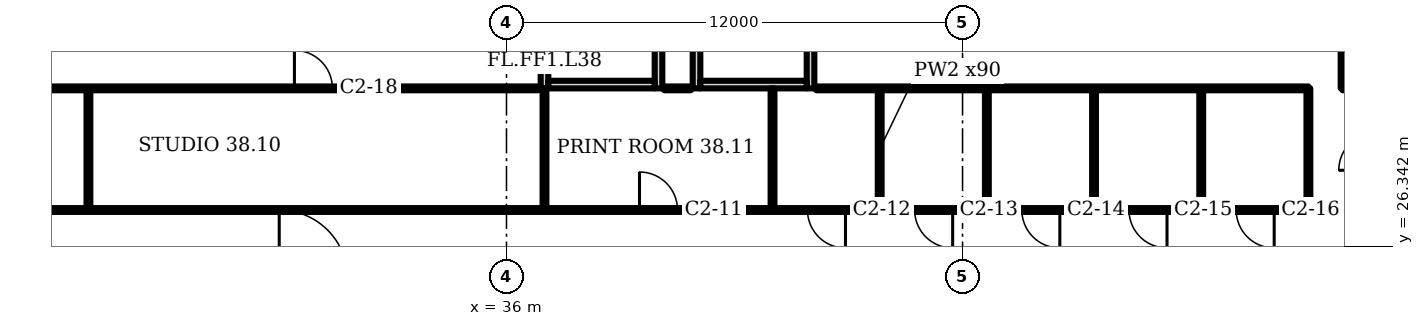
"""IFC4 building model, lengths in metres.
Left out: names, types, materials, properties, quantities, classifications, styles, units other than length and angle.
Written with IfcOpenShell. Run it as: python <this file> out.ifc"""

import sys

from ifc_helpers import new_model, si_unit, direction, frame, frame_2d, origin, place, context, subcontext, project, spatial, rectangle, extrude, element, fill, save


model = new_model("IFC4")
c1 = context("Model", 3, precision=1e-05, world=origin(), true_north=direction((0.0, 1.0)))
c2 = subcontext(c1, "Body", "Model", "MODEL_VIEW")
j1 = project(units=[si_unit("LENGTHUNIT", "METRE"), si_unit("PLANEANGLEUNIT", "RADIAN")], contexts=[c1])
p1 = place(None, origin())
s1 = spatial("IfcSite", under=j1, at=p1, CompositionType="ELEMENT")
p2 = place(p1, origin())
s2 = spatial("IfcBuilding", under=s1, at=p2, CompositionType="ELEMENT")
p3 = place(p2, frame((0.0, 0.0, 159.1)))
s3 = spatial("IfcBuildingStorey", under=s2, at=p3, CompositionType="ELEMENT", Elevation=159.1)
p4 = place(p3, frame((37.0, 30.5, 0.0), z_axis=(0.0, 0.0, 1.0), x_axis=(0.0, 1.0, 0.0)))
e1 = element("IfcWall", 1, at=p4, inside=s3, PredefinedType="PARTITIONING", context=c2, shape_type="SweptSolid", body=[
    extrude(rectangle(XDim=3.5, YDim=0.2, at=frame_2d((1.75, 0.0))), origin(), (0.0, 0.0, 1.0), 3.2),
])
p5 = place(p4, frame((1.2, 0.0, 0.0)))
e2 = element("IfcOpeningElement", 2, at=p5, cuts=e1, PredefinedType="OPENING", context=c2, shape_type="SweptSolid", body=[
    extrude(rectangle(XDim=1.1, YDim=2.1, at=frame_2d((0.55, 1.05))), frame((0.0, 0.11, 0.0), z_axis=(0.0, -1.0, 0.0), x_axis=(1.0, 0.0, 0.0)), (0.0, 0.0, 1.0), 0.22),
])
p6 = place(p3, frame((40.0, 30.5, 0.0), z_axis=(0.0, 0.0, 1.0), x_axis=(0.0, 1.0, 0.0)))
e3 = element("IfcWall", 3, at=p6, inside=s3, PredefinedType="PARTITIONING", context=c2, shape_type="SweptSolid", body=[
    extrude(rectangle(XDim=3.5, YDim=0.2, at=frame_2d((1.75, 0.0))), origin(), (0.0, 0.0, 1.0), 3.2),
])
p7 = place(p3, frame((37.1, 30.6, 0.0), z_axis=(0.0, 0.0, 1.0), x_axis=(1.0, 0.0, 0.0)))
e4 = element("IfcWall", 4, at=p7, inside=s3, PredefinedType="PARTITIONING", context=c2, shape_type="SweptSolid", body=[
    extrude(rectangle(XDim=2.8, YDim=0.2, at=frame_2d((1.4, 0.0))), origin(), (0.0, 0.0, 1.0), 3.2),
])
p8 = place(p3, frame((41.0, 30.5, 0.0), z_axis=(0.0, 0.0, 1.0), x_axis=(0.0, 1.0, 0.0)))
e5 = element("IfcWall", 5, at=p8, inside=s3, PredefinedType="PARTITIONING", context=c2, shape_type="SweptSolid", body=[
    extrude(rectangle(XDim=3.5, YDim=0.2, at=frame_2d((1.75, 0.0))), origin(), (0.0, 0.0, 1.0), 3.2),
])
p9 = place(p3, frame((44.0, 30.5, 0.0), z_axis=(0.0, 0.0, 1.0), x_axis=(0.0, 1.0, 0.0)))
e6 = element("IfcWall", 6, at=p9, inside=s3, PredefinedType="PARTITIONING", context=c2, shape_type="SweptSolid", body=[
    extrude(rectangle(XDim=3.5, YDim=0.2, at=frame_2d((1.75, 0.0))), origin(), (0.0, 0.0, 1.0), 3.2),
])
p10 = place(p9, frame((1.2, 0.0, 0.0)))
e7 = element("IfcOpeningElement", 7, at=p10, cuts=e6, PredefinedType="OPENING", context=c2, shape_type="SweptSolid", body=[
    extrude(rectangle(XDim=1.1, YDim=2.1, at=frame_2d((0.55, 1.05))), frame((0.0, 0.11, 0.0), z_axis=(0.0, -1.0, 0.0), x_axis=(1.0, 0.0, 0.0)), (0.0, 0.0, 1.0), 0.22),
])
p11 = place(p3, frame((41.1, 30.6, 0.0), z_axis=(0.0, 0.0, 1.0), x_axis=(1.0, 0.0, 0.0)))
e8 = element("IfcWall", 8, at=p11, inside=s3, PredefinedType="PARTITIONING", context=c2, shape_type="SweptSolid", body=[
    extrude(rectangle(XDim=2.8, YDim=0.2, at=frame_2d((1.4, 0.0))), origin(), (0.0, 0.0, 1.0), 3.2),
])
p12 = place(p3, frame((16.0, 30.5, 0.0), z_axis=(0.0, 0.0, 1.0), x_axis=(1.0, 0.0, 0.0)))
e9 = element("IfcWall", 9, at=p12, inside=s3, PredefinedType="PARTITIONING", context=c2, shape_type="SweptSolid", body=[
    extrude(rectangle(XDim=20.85, YDim=0.1, at=frame_2d((10.425, 0.0))), origin(), (0.0, 0.0, 1.0), 3.2),
])
p13 = place(p12, frame((14.42, 0.0, 0.0)))
e10 = element("IfcOpeningElement", 10, at=p13, cuts=e9, PredefinedType="OPENING", context=c2, shape_type="SweptSolid", body=[
    extrude(rectangle(XDim=1.0, YDim=2.1, at=frame_2d((0.5, 1.05))), frame((0.0, 0.06, 0.0), z_axis=(0.0, -1.0, 0.0), x_axis=(1.0, 0.0, 0.0)), (0.0, 0.0, 1.0), 0.12),
])
p14 = place(p3, frame((23.2, 27.3, 0.0), z_axis=(0.0, 0.0, 1.0), x_axis=(1.0, 0.0, 0.0)))
e11 = element("IfcWall", 11, at=p14, inside=s3, PredefinedType="PARTITIONING", context=c2, shape_type="SweptSolid", body=[
    extrude(rectangle(XDim=33.9, YDim=0.1, at=frame_2d((16.95, 0.0))), origin(), (0.0, 0.0, 1.0), 3.2),
])
p15 = place(p14, frame((16.3, 0.0, 0.0)))
e12 = element("IfcOpeningElement", 12, at=p15, cuts=e11, PredefinedType="OPENING", context=c2, shape_type="SweptSolid", body=[
    extrude(rectangle(XDim=1.0, YDim=2.1, at=frame_2d((0.5, 1.05))), frame((0.0, 0.06, 0.0), z_axis=(0.0, -1.0, 0.0), x_axis=(1.0, 0.0, 0.0)), (0.0, 0.0, 1.0), 0.12),
])
p16 = place(p14, frame((20.72, 0.0, 0.0)))
e13 = element("IfcOpeningElement", 13, at=p16, cuts=e11, PredefinedType="OPENING", context=c2, shape_type="SweptSolid", body=[
    extrude(rectangle(XDim=1.0, YDim=2.1, at=frame_2d((0.5, 1.05))), frame((0.0, 0.06, 0.0), z_axis=(0.0, -1.0, 0.0), x_axis=(1.0, 0.0, 0.0)), (0.0, 0.0, 1.0), 0.12),
])
p17 = place(p14, frame((23.54, 0.0, 0.0)))
e14 = element("IfcOpeningElement", 14, at=p17, cuts=e11, PredefinedType="OPENING", context=c2, shape_type="SweptSolid", body=[
    extrude(rectangle(XDim=1.0, YDim=2.1, at=frame_2d((0.5, 1.05))), frame((0.0, 0.06, 0.0), z_axis=(0.0, -1.0, 0.0), x_axis=(1.0, 0.0, 0.0)), (0.0, 0.0, 1.0), 0.12),
])
p18 = place(p14, frame((26.36, 0.0, 0.0)))
e15 = element("IfcOpeningElement", 15, at=p18, cuts=e11, PredefinedType="OPENING", context=c2, shape_type="SweptSolid", body=[
    extrude(rectangle(XDim=1.0, YDim=2.1, at=frame_2d((0.5, 1.05))), frame((0.0, 0.06, 0.0), z_axis=(0.0, -1.0, 0.0), x_axis=(1.0, 0.0, 0.0)), (0.0, 0.0, 1.0), 0.12),
])
p19 = place(p14, frame((29.18, 0.0, 0.0)))
e16 = element("IfcOpeningElement", 16, at=p19, cuts=e11, PredefinedType="OPENING", context=c2, shape_type="SweptSolid", body=[
    extrude(rectangle(XDim=1.0, YDim=2.1, at=frame_2d((0.5, 1.05))), frame((0.0, 0.06, 0.0), z_axis=(0.0, -1.0, 0.0), x_axis=(1.0, 0.0, 0.0)), (0.0, 0.0, 1.0), 0.12),
])
p20 = place(p14, frame((32.0, 0.0, 0.0)))
e17 = element("IfcOpeningElement", 17, at=p20, cuts=e11, PredefinedType="OPENING", context=c2, shape_type="SweptSolid", body=[
    extrude(rectangle(XDim=1.0, YDim=2.1, at=frame_2d((0.5, 1.05))), frame((0.0, 0.06, 0.0), z_axis=(0.0, -1.0, 0.0), x_axis=(1.0, 0.0, 0.0)), (0.0, 0.0, 1.0), 0.12),
])
for number, where, z_axis, x_axis in (
    (18, (25.0, 27.3, 0.0), (0.0, 0.0, 1.0), (0.0, 1.0, 0.0)),
    (19, (37.0, 27.3, 0.0), (0.0, 0.0, 1.0), (0.0, 1.0, 0.0)),
    (20, (43.0, 27.3, 0.0), (0.0, 0.0, 1.0), (0.0, 1.0, 0.0)),
    (21, (45.82, 27.3, 0.0), (0.0, 0.0, 1.0), (0.0, 1.0, 0.0)),
    (22, (48.64, 27.3, 0.0), (0.0, 0.0, 1.0), (0.0, 1.0, 0.0)),
    (23, (51.46, 27.3, 0.0), (0.0, 0.0, 1.0), (0.0, 1.0, 0.0)),
    (24, (54.28, 27.3, 0.0), (0.0, 0.0, 1.0), (0.0, 1.0, 0.0)),
    (25, (57.1, 27.3, 0.0), (0.0, 0.0, 1.0), (0.0, 1.0, 0.0)),
):
    element("IfcWall", number, at=place(p3, frame(where, z_axis=z_axis, x_axis=x_axis)), inside=s3, PredefinedType="PARTITIONING", context=c2, shape_type="SweptSolid", body=[
        extrude(rectangle(XDim=3.2, YDim=0.1, at=frame_2d((1.6, 0.0))), origin(), (0.0, 0.0, 1.0), 3.2),
    ])
p21 = place(p3, frame((58.0, 30.5, 0.0), z_axis=(0.0, 0.0, 1.0), x_axis=(0.0, 1.0, 0.0)))
e26 = element("IfcWall", 26, at=p21, inside=s3, PredefinedType="PARTITIONING", context=c2, shape_type="SweptSolid", body=[
    extrude(rectangle(XDim=3.48, YDim=0.1, at=frame_2d((1.74, 0.0))), origin(), (0.0, 0.0, 1.0), 3.2),
])
p22 = place(p3, frame((58.0, 30.5, 0.0), z_axis=(0.0, 0.0, 1.0), x_axis=(1.0, 0.0, 0.0)))
e27 = element("IfcWall", 27, at=p22, inside=s3, PredefinedType="PARTITIONING", context=c2, shape_type="SweptSolid", body=[
    extrude(rectangle(XDim=0.9, YDim=0.1, at=frame_2d((0.45, 0.0))), origin(), (0.0, 0.0, 1.0), 3.2),
])
p23 = place(p3, frame((40.15, 30.5, 0.0), z_axis=(0.0, 0.0, 1.0), x_axis=(1.0, 0.0, 0.0)))
e28 = element("IfcWall", 28, at=p23, inside=s3, PredefinedType="PARTITIONING", context=c2, shape_type="SweptSolid", body=[
    extrude(rectangle(XDim=0.7, YDim=0.1, at=frame_2d((0.35, 0.0))), origin(), (0.0, 0.0, 1.0), 3.2),
])
p24 = place(p3, frame((44.15, 30.5, 0.0), z_axis=(0.0, 0.0, 1.0), x_axis=(1.0, 0.0, 0.0)))
e29 = element("IfcWall", 29, at=p24, inside=s3, PredefinedType="PARTITIONING", context=c2, shape_type="SweptSolid", body=[
    extrude(rectangle(XDim=12.95, YDim=0.1, at=frame_2d((6.475, 0.0))), origin(), (0.0, 0.0, 1.0), 3.2),
])
p25 = place(p15, origin())
e30 = element("IfcDoor", 30, at=p25, inside=s3, OperationType="SINGLE_SWING_LEFT", PredefinedType="DOOR", context=c2, shape_type="SweptSolid", body=[
    extrude(rectangle(XDim=1.0, YDim=2.1, at=frame_2d((0.5, 1.05))), frame((0.0, 0.025, 0.0), z_axis=(0.0, -1.0, 0.0), x_axis=(1.0, 0.0, 0.0)), (0.0, 0.0, 1.0), 0.05),
])
fill(e12, e30)
p26 = place(p16, origin())
e31 = element("IfcDoor", 31, at=p26, inside=s3, OperationType="SINGLE_SWING_RIGHT", PredefinedType="DOOR", context=c2, shape_type="SweptSolid", body=[
    extrude(rectangle(XDim=1.0, YDim=2.1, at=frame_2d((0.5, 1.05))), frame((0.0, 0.025, 0.0), z_axis=(0.0, -1.0, 0.0), x_axis=(1.0, 0.0, 0.0)), (0.0, 0.0, 1.0), 0.05),
])
fill(e13, e31)
p27 = place(p17, origin())
e32 = element("IfcDoor", 32, at=p27, inside=s3, OperationType="SINGLE_SWING_RIGHT", PredefinedType="DOOR", context=c2, shape_type="SweptSolid", body=[
    extrude(rectangle(XDim=1.0, YDim=2.1, at=frame_2d((0.5, 1.05))), frame((0.0, 0.025, 0.0), z_axis=(0.0, -1.0, 0.0), x_axis=(1.0, 0.0, 0.0)), (0.0, 0.0, 1.0), 0.05),
])
fill(e14, e32)
p28 = place(p18, origin())
e33 = element("IfcDoor", 33, at=p28, inside=s3, OperationType="SINGLE_SWING_RIGHT", PredefinedType="DOOR", context=c2, shape_type="SweptSolid", body=[
    extrude(rectangle(XDim=1.0, YDim=2.1, at=frame_2d((0.5, 1.05))), frame((0.0, 0.025, 0.0), z_axis=(0.0, -1.0, 0.0), x_axis=(1.0, 0.0, 0.0)), (0.0, 0.0, 1.0), 0.05),
])
fill(e15, e33)
p29 = place(p19, origin())
e34 = element("IfcDoor", 34, at=p29, inside=s3, OperationType="SINGLE_SWING_RIGHT", PredefinedType="DOOR", context=c2, shape_type="SweptSolid", body=[
    extrude(rectangle(XDim=1.0, YDim=2.1, at=frame_2d((0.5, 1.05))), frame((0.0, 0.025, 0.0), z_axis=(0.0, -1.0, 0.0), x_axis=(1.0, 0.0, 0.0)), (0.0, 0.0, 1.0), 0.05),
])
fill(e16, e34)
p30 = place(p20, origin())
e35 = element("IfcDoor", 35, at=p30, inside=s3, OperationType="SINGLE_SWING_RIGHT", PredefinedType="DOOR", context=c2, shape_type="SweptSolid", body=[
    extrude(rectangle(XDim=1.0, YDim=2.1, at=frame_2d((0.5, 1.05))), frame((0.0, 0.025, 0.0), z_axis=(0.0, -1.0, 0.0), x_axis=(1.0, 0.0, 0.0)), (0.0, 0.0, 1.0), 0.05),
])
fill(e17, e35)
p31 = place(p13, origin())
e36 = element("IfcDoor", 36, at=p31, inside=s3, OperationType="SINGLE_SWING_LEFT", PredefinedType="DOOR", context=c2, shape_type="SweptSolid", body=[
    extrude(rectangle(XDim=1.0, YDim=2.1, at=frame_2d((0.5, 1.05))), frame((0.0, 0.025, 0.0), z_axis=(0.0, -1.0, 0.0), x_axis=(1.0, 0.0, 0.0)), (0.0, 0.0, 1.0), 0.05),
])
fill(e10, e36)
save(model, sys.argv[1])
